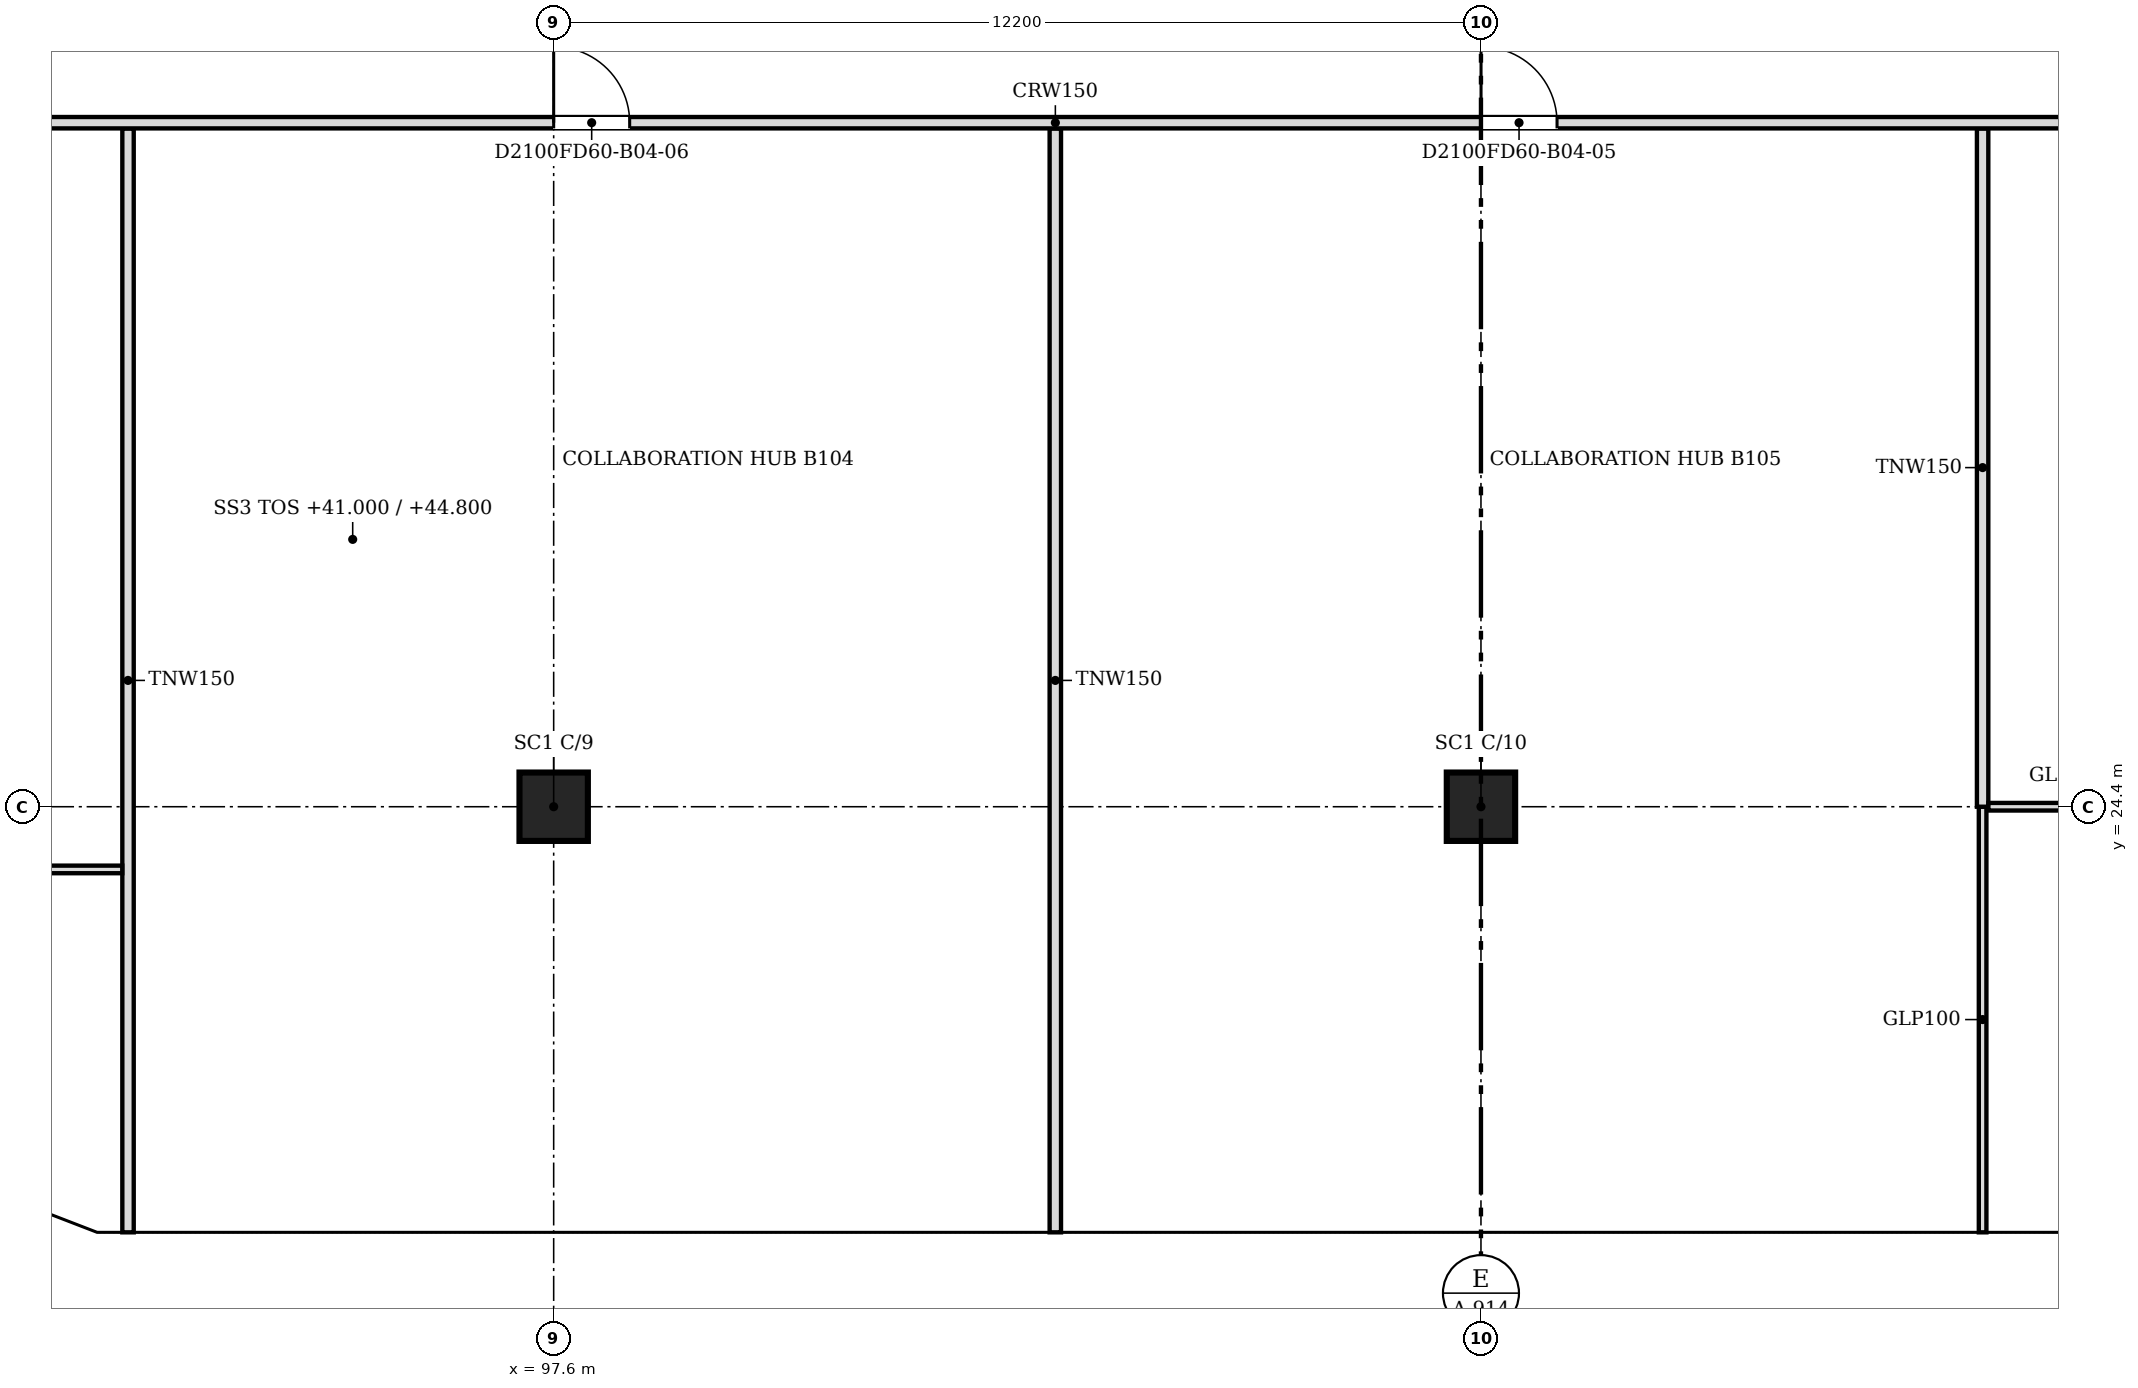
"""IFC4 building model, lengths in metres.
Left out: names, types, materials, properties, quantities, classifications, styles, units other than length and angle.
Written with IfcOpenShell. Run it as: python <this file> out.ifc"""

import sys

from ifc_helpers import new_model, si_unit, direction, frame, frame_2d, origin, origin_2d, place, context, subcontext, project, spatial, polyline, rectangle, outline, extrude, faceted_brep, source, transform, mapped, element, fill, save


model = new_model("IFC4")
c1 = context("Model", 3, precision=1e-05, world=origin(), true_north=direction((0.0, 1.0)))
c2 = subcontext(c1, "Body", "Model", "MODEL_VIEW")
j1 = project(units=[si_unit("LENGTHUNIT", "METRE"), si_unit("PLANEANGLEUNIT", "RADIAN")], contexts=[c1])
p1 = place(None, origin())
s1 = spatial("IfcSite", under=j1, at=p1, CompositionType="ELEMENT")
p2 = place(p1, origin())
s2 = spatial("IfcBuilding", under=s1, at=p2, CompositionType="ELEMENT")
p3 = place(p2, frame((0.0, 0.0, 41.0)))
s3 = spatial("IfcBuildingStorey", under=s2, at=p3, CompositionType="ELEMENT", Elevation=41.0)
for number, where, z_axis, x_axis in (
    (1, (97.6, 24.4, 0.0), (0.0, 0.0, 1.0), (1.0, 0.0, 0.0)),
    (2, (109.8, 24.4, 0.0), (0.0, 0.0, 1.0), (1.0, 0.0, 0.0)),
):
    element("IfcColumn", number, at=place(p3, frame(where, z_axis=z_axis, x_axis=x_axis)), inside=s3, PredefinedType="COLUMN", context=c2, shape_type="SweptSolid", body=[
        extrude(rectangle(XDim=0.9, YDim=0.9, at=origin_2d()), origin(), (0.0, 0.0, 1.0), 3.6),
    ])
m1 = source(origin(), c2, "Body", "Brep", [
    faceted_brep([(0.047, -0.25, 0.0), (3.05, -0.25, 3.8), (0.047, -0.25, 7.6), (0.0, -0.25, 7.54), (0.0, -0.25, 0.06), (0.093, 0.25, 7.541), (3.05, 0.25, 3.8), (0.093, 0.25, 0.059), (0.047, 0.0, 0.0), (0.047, 0.0, 7.6)], [[[0, 1, 2, 3, 4]], [[5, 6, 7]], [[7, 6, 1, 0, 8]], [[6, 5, 9, 2, 1]], [[3, 2, 9]], [[8, 0, 4]], [[7, 8, 4, 3, 9, 5]]]),
])
p4 = place(p3, frame((91.5, 18.55, -3.8), z_axis=(0.0, 0.0, 1.0), x_axis=(1.0, 0.0, 0.0)))
e3 = element("IfcWall", 3, at=p4, inside=s3, PredefinedType="SOLIDWALL", context=c2, shape_type="MappedRepresentation", body=[
    mapped(m1, transform((0.0, 0.0, 0.0), scale=1.0)),
])
m2 = source(origin(), c2, "Body", "SweptSolid", [
    extrude(outline(polyline([(0.247, 0.656), (2.731, 3.8), (0.247, 6.944), (0.247, 0.656)])), frame((0.0, 0.26, 0.0), z_axis=(0.0, -1.0, 0.0), x_axis=(1.0, 0.0, 0.0)), (0.0, 0.0, 1.0), 0.52),
])
p5 = place(p4, origin())
e4 = element("IfcOpeningElement", 4, at=p5, cuts=e3, PredefinedType="OPENING", context=c2, shape_type="MappedRepresentation", body=[
    mapped(m2, transform((0.0, 0.0, 0.0), scale=1.0)),
])
m3 = source(origin(), c2, "Body", "Brep", [
    faceted_brep([(2.95, -0.25, 0.0), (2.997, -0.25, 0.059), (2.997, -0.25, 7.541), (2.95, -0.25, 7.6), (0.0, -0.25, 3.8), (0.053, 0.25, 3.868), (2.904, 0.25, 7.54), (2.904, 0.25, 0.06), (0.053, 0.25, 3.732), (2.95, 0.0, 0.0), (2.95, 0.0, 7.6), (0.0, 0.0, 3.8)], [[[0, 1, 2, 3, 4]], [[5, 6, 7, 8]], [[1, 0, 9]], [[10, 3, 2]], [[6, 5, 11, 4, 3, 10]], [[8, 7, 9, 0, 4, 11]], [[8, 11, 5]], [[1, 9, 7, 6, 10, 2]]]),
])
p6 = place(p3, frame((88.794, 19.612, -3.8), z_axis=(0.0, 0.0, 1.0), x_axis=(0.933000876937, -0.359874094142, 0.0)))
e5 = element("IfcWall", 5, at=p6, inside=s3, PredefinedType="SOLIDWALL", context=c2, shape_type="MappedRepresentation", body=[
    mapped(m3, transform((0.0, 0.0, 0.0), scale=1.0)),
])
m4 = source(origin(), c2, "Body", "SweptSolid", [
    extrude(outline(polyline([(2.75, 6.935), (0.316, 3.8), (2.75, 0.665), (2.75, 6.935)])), frame((0.0, 0.26, 0.0), z_axis=(0.0, -1.0, 0.0), x_axis=(1.0, 0.0, 0.0)), (0.0, 0.0, 1.0), 0.52),
])
p7 = place(p6, origin())
e6 = element("IfcOpeningElement", 6, at=p7, cuts=e5, PredefinedType="OPENING", context=c2, shape_type="MappedRepresentation", body=[
    mapped(m4, transform((0.0, 0.0, 0.0), scale=1.0)),
])
m5 = source(origin(), c2, "Body", "Brep", [
    faceted_brep([(3.05, -0.25, 0.0), (6.1, -0.25, 3.8), (6.1, -0.25, 3.8), (3.05, -0.25, 7.6), (0.0, -0.25, 3.8), (0.0, 0.25, 3.8), (3.05, 0.25, 7.6), (6.1, 0.25, 3.8), (6.1, 0.25, 3.8), (3.05, 0.25, 0.0)], [[[0, 1, 2, 3, 4]], [[5, 6, 7, 8, 9]], [[9, 8, 1, 0]], [[7, 6, 3, 2]], [[6, 5, 4, 3]], [[5, 9, 0, 4]], [[1, 8, 7, 2]]]),
])
p8 = place(p3, frame((94.55, 18.55, -3.8), z_axis=(0.0, 0.0, 1.0), x_axis=(1.0, 0.0, 0.0)))
e7 = element("IfcWall", 7, at=p8, inside=s3, PredefinedType="SOLIDWALL", context=c2, shape_type="MappedRepresentation", body=[
    mapped(m5, transform((0.0, 0.0, 0.0), scale=1.0)),
])
m6 = source(origin(), c2, "Body", "SweptSolid", [
    extrude(outline(polyline([(3.05, 0.399), (5.78, 3.8), (3.05, 7.201), (0.321, 3.8), (3.05, 0.399)])), frame((0.0, 0.26, 0.0), z_axis=(0.0, -1.0, 0.0), x_axis=(1.0, 0.0, 0.0)), (0.0, 0.0, 1.0), 0.52),
])
p9 = place(p8, origin())
e8 = element("IfcOpeningElement", 8, at=p9, cuts=e7, PredefinedType="OPENING", context=c2, shape_type="MappedRepresentation", body=[
    mapped(m6, transform((0.0, 0.0, 0.0), scale=1.0)),
])
m7 = source(origin(), c2, "Body", "SweptSolid", [
    extrude(outline(polyline([(3.05, 0.0), (6.1, 3.8), (3.05, 7.6), (0.0, 3.8), (3.05, 0.0)])), frame((0.0, 0.25, 0.0), z_axis=(0.0, -1.0, 0.0), x_axis=(1.0, 0.0, 0.0)), (0.0, 0.0, 1.0), 0.5),
])
p10 = place(p3, frame((100.65, 18.55, -3.8), z_axis=(0.0, 0.0, 1.0), x_axis=(1.0, 0.0, 0.0)))
e9 = element("IfcWall", 9, at=p10, inside=s3, PredefinedType="SOLIDWALL", context=c2, shape_type="MappedRepresentation", body=[
    mapped(m7, transform((0.0, 0.0, 0.0), scale=1.0)),
])
p11 = place(p10, origin())
e10 = element("IfcOpeningElement", 10, at=p11, cuts=e9, PredefinedType="OPENING", context=c2, shape_type="MappedRepresentation", body=[
    mapped(m6, transform((0.0, 0.0, 0.0), scale=1.0)),
])
p12 = place(p3, frame((106.75, 18.55, -3.8), z_axis=(0.0, 0.0, 1.0), x_axis=(1.0, 0.0, 0.0)))
e11 = element("IfcWall", 11, at=p12, inside=s3, PredefinedType="SOLIDWALL", context=c2, shape_type="MappedRepresentation", body=[
    mapped(m7, transform((0.0, 0.0, 0.0), scale=1.0)),
])
p13 = place(p12, origin())
e12 = element("IfcOpeningElement", 12, at=p13, cuts=e11, PredefinedType="OPENING", context=c2, shape_type="MappedRepresentation", body=[
    mapped(m6, transform((0.0, 0.0, 0.0), scale=1.0)),
])
p14 = place(p3, frame((112.85, 18.55, -3.8), z_axis=(0.0, 0.0, 1.0), x_axis=(1.0, 0.0, 0.0)))
e13 = element("IfcWall", 13, at=p14, inside=s3, PredefinedType="SOLIDWALL", context=c2, shape_type="MappedRepresentation", body=[
    mapped(m5, transform((0.0, 0.0, 0.0), scale=1.0)),
])
p15 = place(p14, origin())
e14 = element("IfcOpeningElement", 14, at=p15, cuts=e13, PredefinedType="OPENING", context=c2, shape_type="MappedRepresentation", body=[
    mapped(m6, transform((0.0, 0.0, 0.0), scale=1.0)),
])
p16 = place(p2, frame((0.0, 0.0, 44.8)))
s4 = spatial("IfcBuildingStorey", under=s2, at=p16, CompositionType="ELEMENT", Elevation=44.8)
m8 = source(origin(), c2, "Body", "Brep", [
    faceted_brep([(3.003, -0.25, 0.0), (6.053, -0.25, 3.8), (3.003, -0.25, 7.6), (0.0, -0.25, 3.8), (0.047, 0.25, 3.859), (3.003, 0.25, 7.6), (6.053, 0.25, 3.8), (3.003, 0.25, 0.0), (0.047, 0.25, 3.741), (0.0, 0.0, 3.8)], [[[0, 1, 2, 3]], [[4, 5, 6, 7, 8]], [[7, 6, 1, 0]], [[6, 5, 2, 1]], [[5, 4, 9, 3, 2]], [[8, 7, 0, 3, 9]], [[8, 9, 4]]]),
])
p17 = place(p16, frame((91.547, 18.55, -3.8), z_axis=(0.0, 0.0, 1.0), x_axis=(1.0, 0.0, 0.0)))
e15 = element("IfcWall", 15, at=p17, inside=s4, PredefinedType="SOLIDWALL", context=c2, shape_type="MappedRepresentation", body=[
    mapped(m8, transform((0.0, 0.0, 0.0), scale=1.0)),
])
m9 = source(origin(), c2, "Body", "SweptSolid", [
    extrude(outline(polyline([(3.005, 0.401), (5.733, 3.8), (3.005, 7.199), (0.319, 3.8), (3.005, 0.401)])), frame((0.0, 0.26, 0.0), z_axis=(0.0, -1.0, 0.0), x_axis=(1.0, 0.0, 0.0)), (0.0, 0.0, 1.0), 0.52),
])
p18 = place(p17, origin())
e16 = element("IfcOpeningElement", 16, at=p18, cuts=e15, PredefinedType="OPENING", context=c2, shape_type="MappedRepresentation", body=[
    mapped(m9, transform((0.0, 0.0, 0.0), scale=1.0)),
])
p19 = place(p16, frame((97.6, 18.55, -3.8), z_axis=(0.0, 0.0, 1.0), x_axis=(1.0, 0.0, 0.0)))
e17 = element("IfcWall", 17, at=p19, inside=s4, PredefinedType="SOLIDWALL", context=c2, shape_type="MappedRepresentation", body=[
    mapped(m5, transform((0.0, 0.0, 0.0), scale=1.0)),
])
p20 = place(p19, origin())
e18 = element("IfcOpeningElement", 18, at=p20, cuts=e17, PredefinedType="OPENING", context=c2, shape_type="MappedRepresentation", body=[
    mapped(m6, transform((0.0, 0.0, 0.0), scale=1.0)),
])
p21 = place(p16, frame((103.7, 18.55, -3.8), z_axis=(0.0, 0.0, 1.0), x_axis=(1.0, 0.0, 0.0)))
e19 = element("IfcWall", 19, at=p21, inside=s4, PredefinedType="SOLIDWALL", context=c2, shape_type="MappedRepresentation", body=[
    mapped(m7, transform((0.0, 0.0, 0.0), scale=1.0)),
])
p22 = place(p21, origin())
e20 = element("IfcOpeningElement", 20, at=p22, cuts=e19, PredefinedType="OPENING", context=c2, shape_type="MappedRepresentation", body=[
    mapped(m6, transform((0.0, 0.0, 0.0), scale=1.0)),
])
p23 = place(p16, frame((109.8, 18.55, -3.8), z_axis=(0.0, 0.0, 1.0), x_axis=(1.0, 0.0, 0.0)))
e21 = element("IfcWall", 21, at=p23, inside=s4, PredefinedType="SOLIDWALL", context=c2, shape_type="MappedRepresentation", body=[
    mapped(m5, transform((0.0, 0.0, 0.0), scale=1.0)),
])
p24 = place(p23, origin())
e22 = element("IfcOpeningElement", 22, at=p24, cuts=e21, PredefinedType="OPENING", context=c2, shape_type="MappedRepresentation", body=[
    mapped(m6, transform((0.0, 0.0, 0.0), scale=1.0)),
])
p25 = place(p16, frame((115.9, 18.55, -3.8), z_axis=(0.0, 0.0, 1.0), x_axis=(1.0, 0.0, 0.0)))
e23 = element("IfcWall", 23, at=p25, inside=s4, PredefinedType="SOLIDWALL", context=c2, shape_type="MappedRepresentation", body=[
    mapped(m7, transform((0.0, 0.0, 0.0), scale=1.0)),
])
p26 = place(p25, origin())
e24 = element("IfcOpeningElement", 24, at=p26, cuts=e23, PredefinedType="OPENING", context=c2, shape_type="MappedRepresentation", body=[
    mapped(m6, transform((0.0, 0.0, 0.0), scale=1.0)),
])
m10 = source(origin(), c2, "Body", "Brep", [
    faceted_brep([(0.053, -0.25, 0.0), (3.003, -0.25, 3.8), (0.053, -0.25, 7.6), (0.0, -0.25, 7.532), (0.0, -0.25, 0.068), (0.106, 0.25, 7.532), (2.957, 0.25, 3.86), (2.957, 0.25, 3.74), (0.106, 0.25, 0.068), (3.003, 0.0, 3.8), (0.053, 0.0, 0.0), (0.053, 0.0, 7.6)], [[[0, 1, 2, 3, 4]], [[5, 6, 7, 8]], [[8, 7, 9, 1, 0, 10]], [[6, 5, 11, 2, 1, 9]], [[3, 2, 11]], [[10, 0, 4]], [[8, 10, 4, 3, 11, 5]], [[9, 7, 6]]]),
])
p27 = place(p16, frame((88.744, 19.631, -3.8), z_axis=(0.0, 0.0, 1.0), x_axis=(0.932997369089, -0.359883188373, 0.0)))
e25 = element("IfcWall", 25, at=p27, inside=s4, PredefinedType="SOLIDWALL", context=c2, shape_type="MappedRepresentation", body=[
    mapped(m10, transform((0.0, 0.0, 0.0), scale=1.0)),
])
m11 = source(origin(), c2, "Body", "SweptSolid", [
    extrude(outline(polyline([(0.253, 0.665), (2.687, 3.8), (0.253, 6.935), (0.253, 0.665)])), frame((0.0, 0.26, 0.0), z_axis=(0.0, -1.0, 0.0), x_axis=(1.0, 0.0, 0.0)), (0.0, 0.0, 1.0), 0.52),
])
p28 = place(p27, origin())
e26 = element("IfcOpeningElement", 26, at=p28, cuts=e25, PredefinedType="OPENING", context=c2, shape_type="MappedRepresentation", body=[
    mapped(m11, transform((0.0, 0.0, 0.0), scale=1.0)),
])
for number, where, z_axis, x_axis in (
    (27, (92.0, 18.8, 0.0), (0.0, 0.0, 1.0), (0.0, 1.0, 0.0)),
    (28, (104.2, 18.8, 0.0), (0.0, 0.0, 1.0), (0.0, 1.0, 0.0)),
):
    element("IfcWall", number, at=place(p3, frame(where, z_axis=z_axis, x_axis=x_axis)), inside=s3, PredefinedType="PARTITIONING", context=c2, shape_type="SweptSolid", body=[
        extrude(rectangle(XDim=14.524, YDim=0.15, at=frame_2d((7.262, 0.0))), origin(), (0.0, 0.0, 1.0), 3.067),
    ])
p29 = place(p3, frame((116.4, 18.8, 0.0), z_axis=(0.0, 0.0, 1.0), x_axis=(0.0, 1.0, 0.0)))
e29 = element("IfcWall", 29, at=p29, inside=s3, PredefinedType="PARTITIONING", context=c2, shape_type="SweptSolid", body=[
    extrude(rectangle(XDim=5.599, YDim=0.1, at=frame_2d((2.799, 0.0))), origin(), (0.0, 0.0, 1.0), 3.067),
])
p30 = place(p3, frame((91.924, 23.575, 0.0), z_axis=(0.0, 0.0, 1.0), x_axis=(-1.0, 0.0, 0.0)))
e30 = element("IfcWall", 30, at=p30, inside=s3, PredefinedType="PARTITIONING", context=c2, shape_type="SweptSolid", body=[
    extrude(rectangle(XDim=5.67, YDim=0.1, at=frame_2d((2.835, 0.0))), origin(), (0.0, 0.0, 1.0), 3.067),
])
m12 = source(origin(), c2, "Body", "SweptSolid", [
    extrude(rectangle(XDim=0.9, YDim=2.1, at=frame_2d((0.45, 1.05))), frame((0.0, 0.06, 0.0), z_axis=(0.0, -1.0, 0.0), x_axis=(1.0, 0.0, 0.0)), (0.0, 0.0, 1.0), 0.12),
])
p31 = place(p30, frame((2.37, 0.0, 0.0)))
e31 = element("IfcOpeningElement", 31, at=p31, cuts=e30, PredefinedType="OPENING", context=c2, shape_type="MappedRepresentation", body=[
    mapped(m12, transform((0.0, 0.0, 0.0), scale=1.0)),
])
p32 = place(p3, frame((116.4, 24.4, 0.0), z_axis=(0.0, 0.0, 1.0), x_axis=(0.0, 1.0, 0.0)))
e32 = element("IfcWall", 32, at=p32, inside=s3, PredefinedType="PARTITIONING", context=c2, shape_type="SweptSolid", body=[
    extrude(rectangle(XDim=8.924, YDim=0.15, at=frame_2d((4.462, 0.0))), origin(), (0.0, 0.0, 1.0), 3.067),
])
p33 = place(p3, frame((121.549, 24.4, 0.0), z_axis=(0.0, 0.0, 1.0), x_axis=(-1.0, 0.0, 0.0)))
e33 = element("IfcWall", 33, at=p33, inside=s3, PredefinedType="PARTITIONING", context=c2, shape_type="SweptSolid", body=[
    extrude(rectangle(XDim=5.073, YDim=0.1, at=frame_2d((2.537, 0.0))), origin(), (0.0, 0.0, 1.0), 3.067),
])
p34 = place(p33, frame((2.073, 0.0, 0.0)))
e34 = element("IfcOpeningElement", 34, at=p34, cuts=e33, PredefinedType="OPENING", context=c2, shape_type="MappedRepresentation", body=[
    mapped(m12, transform((0.0, 0.0, 0.0), scale=1.0)),
])
p35 = place(p3, frame((133.7, 33.4, 0.0), z_axis=(0.0, 0.0, 1.0), x_axis=(-1.0, 0.0, 0.0)))
e35 = element("IfcWall", 35, at=p35, inside=s3, PredefinedType="PARTITIONING", context=c2, shape_type="SweptSolid", body=[
    extrude(rectangle(XDim=47.8, YDim=0.15, at=frame_2d((23.9, 0.0))), origin(), (0.0, 0.0, 1.0), 3.067),
])
m13 = source(origin(), c2, "Body", "SweptSolid", [
    extrude(rectangle(XDim=0.9, YDim=2.1, at=frame_2d((0.45, 1.05))), frame((0.0, 0.085, 0.0), z_axis=(0.0, -1.0, 0.0), x_axis=(1.0, 0.0, 0.0)), (0.0, 0.0, 1.0), 0.17),
])
p36 = place(p35, frame((14.099, 0.0, 0.0)))
e36 = element("IfcOpeningElement", 36, at=p36, cuts=e35, PredefinedType="OPENING", context=c2, shape_type="MappedRepresentation", body=[
    mapped(m13, transform((0.0, 0.0, 0.0), scale=1.0)),
])
p37 = place(p35, frame((44.3, 0.0, 0.0)))
e37 = element("IfcOpeningElement", 37, at=p37, cuts=e35, PredefinedType="OPENING", context=c2, shape_type="MappedRepresentation", body=[
    mapped(m13, transform((0.0, 0.0, 0.0), scale=1.0)),
])
p38 = place(p35, frame((5.4, 0.0, 0.0)))
e38 = element("IfcOpeningElement", 38, at=p38, cuts=e35, PredefinedType="OPENING", context=c2, shape_type="MappedRepresentation", body=[
    mapped(m13, transform((0.0, 0.0, 0.0), scale=1.0)),
])
m14 = source(origin(), c2, "Body", "SweptSolid", [
    extrude(rectangle(XDim=1.0, YDim=2.1, at=frame_2d((0.5, 1.05))), frame((0.0, 0.085, 0.0), z_axis=(0.0, -1.0, 0.0), x_axis=(1.0, 0.0, 0.0)), (0.0, 0.0, 1.0), 0.17),
])
p39 = place(p35, frame((22.899, 0.0, 0.0)))
e39 = element("IfcOpeningElement", 39, at=p39, cuts=e35, PredefinedType="OPENING", context=c2, shape_type="MappedRepresentation", body=[
    mapped(m14, transform((0.0, 0.0, 0.0), scale=1.0)),
])
p40 = place(p35, frame((35.1, 0.0, 0.0)))
e40 = element("IfcOpeningElement", 40, at=p40, cuts=e35, PredefinedType="OPENING", context=c2, shape_type="MappedRepresentation", body=[
    mapped(m14, transform((0.0, 0.0, 0.0), scale=1.0)),
])
m15 = source(origin(), c2, "Body", "SweptSolid", [
    extrude(rectangle(XDim=1.0, YDim=2.1, at=frame_2d((0.5, 1.05))), frame((0.0, 0.025, 0.0), z_axis=(0.0, -1.0, 0.0), x_axis=(1.0, 0.0, 0.0)), (0.0, 0.0, 1.0), 0.05),
])
p41 = place(p39, origin())
e41 = element("IfcDoor", 41, at=p41, inside=s3, OperationType="SINGLE_SWING_RIGHT", PredefinedType="DOOR", context=c2, shape_type="MappedRepresentation", body=[
    mapped(m15, transform((0.0, 0.0, 0.0), scale=1.0)),
])
fill(e39, e41)
p42 = place(p40, origin())
e42 = element("IfcDoor", 42, at=p42, inside=s3, OperationType="SINGLE_SWING_RIGHT", PredefinedType="DOOR", context=c2, shape_type="MappedRepresentation", body=[
    mapped(m15, transform((0.0, 0.0, 0.0), scale=1.0)),
])
fill(e40, e42)
save(model, sys.argv[1])
